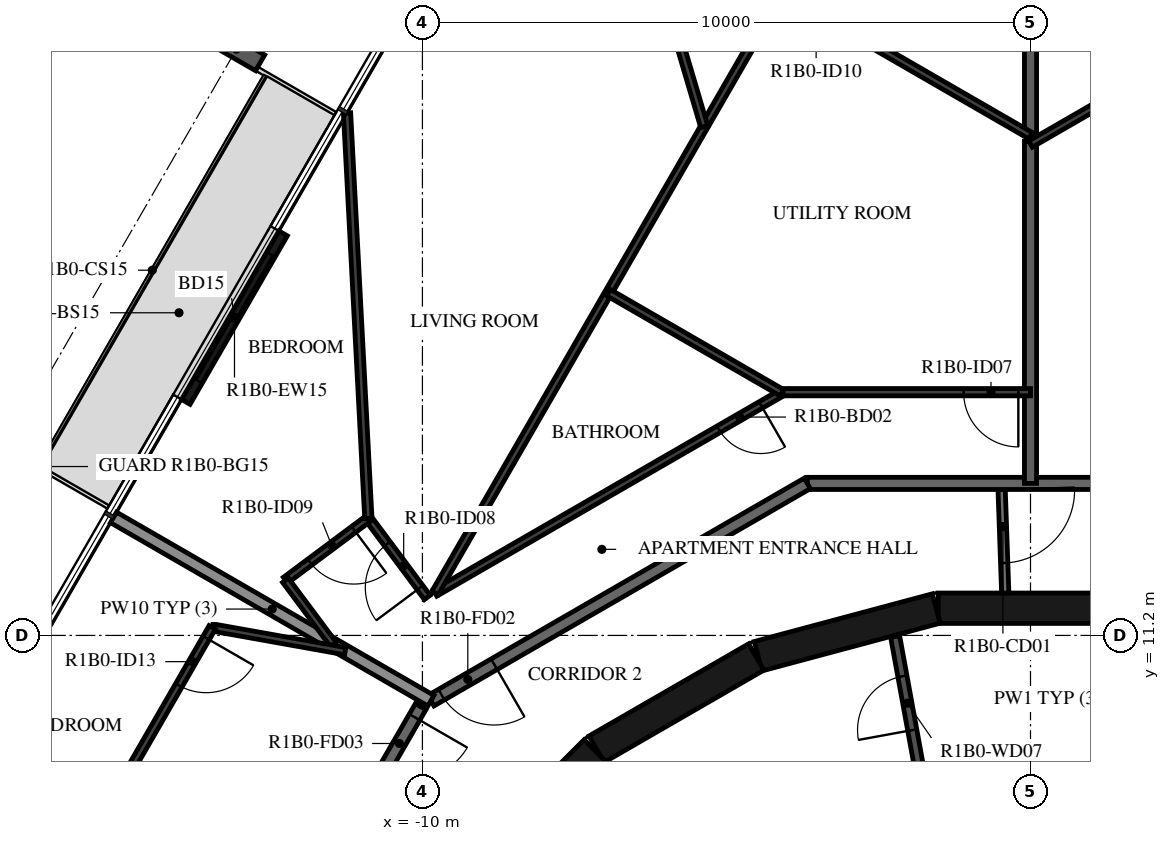
"""IFC4 building model, lengths in metres.
Left out: names, types, materials, properties, quantities, classifications, styles, units other than length and angle.
Written with IfcOpenShell. Run it as: python <this file> out.ifc"""

import sys

from ifc_helpers import new_model, si_unit, direction, frame, frame_2d, origin, origin_2d, place, context, subcontext, project, spatial, rectangle, i_section, extrude, element, fill, save


model = new_model("IFC4")
c1 = context("Model", 3, precision=1e-05, world=origin(), true_north=direction((0.0, 1.0)))
c2 = subcontext(c1, "Body", "Model", "MODEL_VIEW")
j1 = project(units=[si_unit("LENGTHUNIT", "METRE"), si_unit("PLANEANGLEUNIT", "RADIAN")], contexts=[c1])
p1 = place(None, origin())
s1 = spatial("IfcSite", under=j1, at=p1, CompositionType="ELEMENT")
p2 = place(p1, origin())
s2 = spatial("IfcBuilding", under=s1, at=p2, CompositionType="ELEMENT")
p3 = place(p2, frame((0.0, 0.0, 52.4)))
s3 = spatial("IfcBuildingStorey", under=s2, at=p3, CompositionType="ELEMENT", Elevation=52.4)
p4 = place(p3, frame((-13.059, 20.842, -0.38), z_axis=(0.0, 0.0, 1.0), x_axis=(0.50000017485, 0.866025302835, 0.0)))
e1 = element("IfcColumn", 1, at=p4, inside=s3, PredefinedType="COLUMN", context=c2, shape_type="SweptSolid", body=[
    extrude(i_section(OverallWidth=0.3, OverallDepth=0.9, WebThickness=0.019, FlangeThickness=0.035, FilletRadius=0.03, at=origin_2d()), origin(), (0.0, 0.0, 1.0), 3.5),
])
p5 = place(p3, frame((-12.291, 17.812, 0.0), z_axis=(0.0, 0.0, 1.0), x_axis=(-0.499971222258, -0.866042017984, 0.0)))
e2 = element("IfcWall", 2, at=p5, inside=s3, PredefinedType="STANDARD", context=c2, shape_type="SweptSolid", body=[
    extrude(rectangle(XDim=3.2, YDim=0.16, at=frame_2d((1.6, 0.0))), origin(), (0.0, 0.0, 1.0), 3.12),
])
p6 = place(p5, frame((0.4, 0.0, 0.0)))
e3 = element("IfcOpeningElement", 3, at=p6, cuts=e2, PredefinedType="OPENING", context=c2, shape_type="SweptSolid", body=[
    extrude(rectangle(XDim=2.4, YDim=2.4, at=frame_2d((1.2, 1.2))), frame((0.0, 0.09, 0.0), z_axis=(0.0, -1.0, 0.0), x_axis=(1.0, 0.0, 0.0)), (0.0, 0.0, 1.0), 0.18),
])
for number, where, z_axis, x_axis in (
    (4, (1.516, 11.647, 0.0), (0.0, 0.0, 1.0), (-1.0, 0.0, 0.0)),
    (5, (-1.55, 11.643, 0.0), (0.0, 0.0, 1.0), (-0.966, -0.259, 0.0)),
    (6, (-4.51, 10.845, 0.0), (0.0, 0.0, 1.0), (-0.866, -0.5, 0.0)),
):
    element("IfcWall", number, at=place(p3, frame(where, z_axis=z_axis, x_axis=x_axis)), inside=s3, PredefinedType="SHEAR", context=c2, shape_type="SweptSolid", body=[
        extrude(rectangle(XDim=3.033, YDim=0.5, at=frame_2d((1.516, 0.0))), origin(), (0.0, 0.0, 1.0), 3.12),
    ])
p7 = place(p3, frame((-7.164, 9.308, 0.0), z_axis=(0.0, 0.0, 1.0), x_axis=(-0.707106781187, -0.707106781187, 0.0)))
e7 = element("IfcWall", 7, at=p7, inside=s3, PredefinedType="SHEAR", context=c2, shape_type="SweptSolid", body=[
    extrude(rectangle(XDim=3.032, YDim=0.5, at=frame_2d((1.516, 0.0))), origin(), (0.0, 0.0, 1.0), 3.12),
])
p8 = place(p7, frame((1.416, 0.0, 0.0)))
e8 = element("IfcOpeningElement", 8, at=p8, cuts=e7, PredefinedType="OPENING", context=c2, shape_type="SweptSolid", body=[
    extrude(rectangle(XDim=1.2, YDim=2.1, at=frame_2d((0.6, 1.05))), frame((0.0, 0.26, 0.0), z_axis=(0.0, -1.0, 0.0), x_axis=(1.0, 0.0, 0.0)), (0.0, 0.0, 1.0), 0.52),
])
p9 = place(p3, frame((-1.825, 8.99, 0.0), z_axis=(0.0, 0.0, 1.0), x_axis=(-0.179955206115, 0.983674805915, 0.0)))
e9 = element("IfcWall", 9, at=p9, inside=s3, PredefinedType="PARTITIONING", context=c2, shape_type="SweptSolid", body=[
    extrude(rectangle(XDim=2.229, YDim=0.15, at=frame_2d((1.115, 0.0))), origin(), (0.0, 0.0, 1.0), 3.12),
])
p10 = place(p9, frame((0.665, 0.0, 0.0)))
e10 = element("IfcOpeningElement", 10, at=p10, cuts=e9, PredefinedType="OPENING", context=c2, shape_type="SweptSolid", body=[
    extrude(rectangle(XDim=0.9, YDim=2.1, at=frame_2d((0.45, 1.05))), frame((0.0, 0.085, 0.0), z_axis=(0.0, -1.0, 0.0), x_axis=(1.0, 0.0, 0.0)), (0.0, 0.0, 1.0), 0.17),
])
p11 = place(p3, frame((-0.479, 13.7, 0.0), z_axis=(0.0, 0.0, 1.0), x_axis=(0.034919103017, -0.999390142159, 0.0)))
e11 = element("IfcWall", 11, at=p11, inside=s3, PredefinedType="PARTITIONING", context=c2, shape_type="SweptSolid", body=[
    extrude(rectangle(XDim=1.804, YDim=0.12, at=frame_2d((0.902, 0.0))), origin(), (0.0, 0.0, 1.0), 3.12),
])
p12 = place(p11, frame((0.11, 0.0, 0.0)))
e12 = element("IfcOpeningElement", 12, at=p12, cuts=e11, PredefinedType="OPENING", context=c2, shape_type="SweptSolid", body=[
    extrude(rectangle(XDim=1.2, YDim=2.1, at=frame_2d((0.6, 1.05))), frame((0.0, 0.07, 0.0), z_axis=(0.0, -1.0, 0.0), x_axis=(1.0, 0.0, 0.0)), (0.0, 0.0, 1.0), 0.14),
])
p13 = place(p3, frame((3.671, 13.7, 0.0), z_axis=(0.0, 0.0, 1.0), x_axis=(-1.0, 0.0, 0.0)))
e13 = element("IfcWall", 13, at=p13, inside=s3, PredefinedType="STANDARD", context=c2, shape_type="SweptSolid", body=[
    extrude(rectangle(XDim=7.342, YDim=0.2, at=frame_2d((3.671, 0.0))), origin(), (0.0, 0.0, 1.0), 3.12),
])
p14 = place(p3, frame((-3.671, 13.7, 0.0), z_axis=(0.0, 0.0, 1.0), x_axis=(-0.866031419417, -0.499989580474, 0.0)))
e14 = element("IfcWall", 14, at=p14, inside=s3, PredefinedType="STANDARD", context=c2, shape_type="SweptSolid", body=[
    extrude(rectangle(XDim=7.147, YDim=0.2, at=frame_2d((3.573, 0.0))), origin(), (0.0, 0.0, 1.0), 3.12),
])
p15 = place(p14, frame((5.947, 0.0, 0.0)))
e15 = element("IfcOpeningElement", 15, at=p15, cuts=e14, PredefinedType="OPENING", context=c2, shape_type="SweptSolid", body=[
    extrude(rectangle(XDim=1.0, YDim=2.1, at=frame_2d((0.5, 1.05))), frame((0.0, 0.11, 0.0), z_axis=(0.0, -1.0, 0.0), x_axis=(1.0, 0.0, 0.0)), (0.0, 0.0, 1.0), 0.22),
])
p16 = place(p3, frame((-10.029, 10.029, 0.0), z_axis=(0.0, 0.0, 1.0), x_axis=(-0.500001669485, -0.866024439905, 0.0)))
e16 = element("IfcWall", 16, at=p16, inside=s3, PredefinedType="STANDARD", context=c2, shape_type="SweptSolid", body=[
    extrude(rectangle(XDim=7.342, YDim=0.2, at=frame_2d((3.671, 0.0))), origin(), (0.0, 0.0, 1.0), 3.12),
])
p17 = place(p16, frame((0.2, 0.0, 0.0)))
e17 = element("IfcOpeningElement", 17, at=p17, cuts=e16, PredefinedType="OPENING", context=c2, shape_type="SweptSolid", body=[
    extrude(rectangle(XDim=1.0, YDim=2.1, at=frame_2d((0.5, 1.05))), frame((0.0, 0.11, 0.0), z_axis=(0.0, -1.0, 0.0), x_axis=(1.0, 0.0, 0.0)), (0.0, 0.0, 1.0), 0.22),
])
p18 = place(p3, frame((0.0, 19.326, 0.0), z_axis=(0.0, 0.0, 1.0), x_axis=(0.0, -1.0, 0.0)))
e18 = element("IfcWall", 18, at=p18, inside=s3, PredefinedType="STANDARD", context=c2, shape_type="SweptSolid", body=[
    extrude(rectangle(XDim=5.626, YDim=0.2, at=frame_2d((2.813, 0.0))), origin(), (0.0, 0.0, 1.0), 3.12),
])
p19 = place(p3, frame((0.0, 21.81, 0.0), z_axis=(0.0, 0.0, 1.0), x_axis=(0.0, -1.0, 0.0)))
e19 = element("IfcWall", 19, at=p19, inside=s3, PredefinedType="STANDARD", context=c2, shape_type="SweptSolid", body=[
    extrude(rectangle(XDim=2.392, YDim=0.2, at=frame_2d((1.196, 0.0))), origin(), (0.0, 0.0, 1.0), 3.12),
])
p20 = place(p3, frame((-15.08, 13.14, 0.0), z_axis=(0.0, 0.0, 1.0), x_axis=(0.86603112331, -0.49999009336, 0.0)))
e20 = element("IfcWall", 20, at=p20, inside=s3, PredefinedType="STANDARD", context=c2, shape_type="SweptSolid", body=[
    extrude(rectangle(XDim=6.027, YDim=0.2, at=frame_2d((3.014, 0.0))), origin(), (0.0, 0.0, 1.0), 2.73),
])
p21 = place(p3, frame((4.841, 22.075, 0.0), z_axis=(0.0, 0.0, 1.0), x_axis=(-0.866019751484, -0.500009789943, 0.0)))
e21 = element("IfcWall", 21, at=p21, inside=s3, PredefinedType="PARTITIONING", context=c2, shape_type="SweptSolid", body=[
    extrude(rectangle(XDim=5.59, YDim=0.12, at=frame_2d((2.795, 0.0))), origin(), (0.0, 0.0, 1.0), 3.12),
])
p22 = place(p21, frame((0.2, 0.0, 0.0)))
e22 = element("IfcOpeningElement", 22, at=p22, cuts=e21, PredefinedType="OPENING", context=c2, shape_type="SweptSolid", body=[
    extrude(rectangle(XDim=0.9, YDim=2.1, at=frame_2d((0.45, 1.05))), frame((0.0, 0.07, 0.0), z_axis=(0.0, -1.0, 0.0), x_axis=(1.0, 0.0, 0.0)), (0.0, 0.0, 1.0), 0.14),
])
p23 = place(p3, frame((0.0, 15.2, 0.0), z_axis=(0.0, 0.0, 1.0), x_axis=(-1.0, 0.0, 0.0)))
e23 = element("IfcWall", 23, at=p23, inside=s3, PredefinedType="PARTITIONING", context=c2, shape_type="SweptSolid", body=[
    extrude(rectangle(XDim=4.073, YDim=0.12, at=frame_2d((2.036, 0.0))), origin(), (0.0, 0.0, 1.0), 3.12),
])
p24 = place(p23, frame((0.2, 0.0, 0.0)))
e24 = element("IfcOpeningElement", 24, at=p24, cuts=e23, PredefinedType="OPENING", context=c2, shape_type="SweptSolid", body=[
    extrude(rectangle(XDim=0.9, YDim=2.1, at=frame_2d((0.45, 1.05))), frame((0.0, 0.07, 0.0), z_axis=(0.0, -1.0, 0.0), x_axis=(1.0, 0.0, 0.0)), (0.0, 0.0, 1.0), 0.14),
])
p25 = place(p3, frame((-9.92, 11.824, 0.0), z_axis=(0.0, 0.0, 1.0), x_axis=(-0.597853402964, 0.801605456921, 0.0)))
e25 = element("IfcWall", 25, at=p25, inside=s3, PredefinedType="PARTITIONING", context=c2, shape_type="SweptSolid", body=[
    extrude(rectangle(XDim=1.621, YDim=0.12, at=frame_2d((0.811, 0.0))), origin(), (0.0, 0.0, 1.0), 3.12),
])
p26 = place(p25, frame((0.2, 0.0, 0.0)))
e26 = element("IfcOpeningElement", 26, at=p26, cuts=e25, PredefinedType="OPENING", context=c2, shape_type="SweptSolid", body=[
    extrude(rectangle(XDim=0.9, YDim=2.1, at=frame_2d((0.45, 1.05))), frame((0.0, 0.07, 0.0), z_axis=(0.0, -1.0, 0.0), x_axis=(1.0, 0.0, 0.0)), (0.0, 0.0, 1.0), 0.14),
])
p27 = place(p3, frame((-4.088, 15.191, 0.0), z_axis=(0.0, 0.0, 1.0), x_axis=(-0.866024500911, -0.50000156382, 0.0)))
e27 = element("IfcWall", 27, at=p27, inside=s3, PredefinedType="PARTITIONING", context=c2, shape_type="SweptSolid", body=[
    extrude(rectangle(XDim=6.587, YDim=0.12, at=frame_2d((3.294, 0.0))), origin(), (0.0, 0.0, 1.0), 3.12),
])
p28 = place(p27, frame((0.4, 0.0, 0.0)))
e28 = element("IfcOpeningElement", 28, at=p28, cuts=e27, PredefinedType="OPENING", context=c2, shape_type="SweptSolid", body=[
    extrude(rectangle(XDim=0.8, YDim=2.1, at=frame_2d((0.4, 1.05))), frame((0.0, 0.07, 0.0), z_axis=(0.0, -1.0, 0.0), x_axis=(1.0, 0.0, 0.0)), (0.0, 0.0, 1.0), 0.14),
])
p29 = place(p3, frame((-10.889, 13.124, 0.0), z_axis=(0.0, 0.0, 1.0), x_axis=(-0.801616976804, -0.597837956724, 0.0)))
e29 = element("IfcWall", 29, at=p29, inside=s3, PredefinedType="PARTITIONING", context=c2, shape_type="SweptSolid", body=[
    extrude(rectangle(XDim=1.7, YDim=0.12, at=frame_2d((0.85, 0.0))), origin(), (0.0, 0.0, 1.0), 3.12),
])
p30 = place(p29, frame((0.3, 0.0, 0.0)))
e30 = element("IfcOpeningElement", 30, at=p30, cuts=e29, PredefinedType="OPENING", context=c2, shape_type="SweptSolid", body=[
    extrude(rectangle(XDim=0.9, YDim=2.1, at=frame_2d((0.45, 1.05))), frame((0.0, 0.07, 0.0), z_axis=(0.0, -1.0, 0.0), x_axis=(1.0, 0.0, 0.0)), (0.0, 0.0, 1.0), 0.14),
])
p31 = place(p3, frame((-12.252, 12.107, 0.0), z_axis=(0.0, 0.0, 1.0), x_axis=(0.597827926538, -0.801624457119, 0.0)))
e31 = element("IfcWall", 31, at=p31, inside=s3, PredefinedType="PARTITIONING", context=c2, shape_type="SweptSolid", body=[
    extrude(rectangle(XDim=1.314, YDim=0.12, at=frame_2d((0.657, 0.0))), origin(), (0.0, 0.0, 1.0), 3.12),
])
p32 = place(p3, frame((-9.793, 11.897, 0.0), z_axis=(0.0, 0.0, 1.0), x_axis=(0.499981117606, 0.866036305265, 0.0)))
e32 = element("IfcWall", 32, at=p32, inside=s3, PredefinedType="PARTITIONING", context=c2, shape_type="SweptSolid", body=[
    extrude(rectangle(XDim=14.434, YDim=0.12, at=frame_2d((7.217, 0.0))), origin(), (0.0, 0.0, 1.0), 3.12),
])
p33 = place(p32, frame((11.97, 0.0, 0.0)))
e33 = element("IfcOpeningElement", 33, at=p33, cuts=e32, PredefinedType="OPENING", context=c2, shape_type="SweptSolid", body=[
    extrude(rectangle(XDim=0.9, YDim=2.1, at=frame_2d((0.45, 1.05))), frame((0.0, 0.07, 0.0), z_axis=(0.0, -1.0, 0.0), x_axis=(1.0, 0.0, 0.0)), (0.0, 0.0, 1.0), 0.14),
])
p34 = place(p3, frame((-4.088, 21.779, 0.0), z_axis=(0.0, 0.0, 1.0), x_axis=(0.866032292145, -0.49998806882, 0.0)))
e34 = element("IfcWall", 34, at=p34, inside=s3, PredefinedType="PARTITIONING", context=c2, shape_type="SweptSolid", body=[
    extrude(rectangle(XDim=4.721, YDim=0.12, at=frame_2d((2.36, 0.0))), origin(), (0.0, 0.0, 1.0), 3.12),
])
p35 = place(p34, frame((0.2, 0.0, 0.0)))
e35 = element("IfcOpeningElement", 35, at=p35, cuts=e34, PredefinedType="OPENING", context=c2, shape_type="SweptSolid", body=[
    extrude(rectangle(XDim=0.9, YDim=2.1, at=frame_2d((0.45, 1.05))), frame((0.0, 0.07, 0.0), z_axis=(0.0, -1.0, 0.0), x_axis=(1.0, 0.0, 0.0)), (0.0, 0.0, 1.0), 0.14),
])
p36 = place(p3, frame((-6.941, 16.838, 0.0), z_axis=(0.0, 0.0, 1.0), x_axis=(0.866017718408, -0.500013311227, 0.0)))
e36 = element("IfcWall", 36, at=p36, inside=s3, PredefinedType="PARTITIONING", context=c2, shape_type="SweptSolid", body=[
    extrude(rectangle(XDim=3.294, YDim=0.12, at=frame_2d((1.647, 0.0))), origin(), (0.0, 0.0, 1.0), 3.12),
])
p37 = place(p3, frame((-7.4, 26.443, 0.0), z_axis=(0.0, 0.0, 1.0), x_axis=(0.283756762476, -0.958896292489, 0.0)))
e37 = element("IfcWall", 37, at=p37, inside=s3, PredefinedType="PARTITIONING", context=c2, shape_type="SweptSolid", body=[
    extrude(rectangle(XDim=7.17, YDim=0.12, at=frame_2d((3.585, 0.0))), origin(), (0.0, 0.0, 1.0), 3.12),
])
p38 = place(p3, frame((-11.24, 19.792, 0.0), z_axis=(0.0, 0.0, 1.0), x_axis=(0.052579943632, -0.998616718029, 0.0)))
e38 = element("IfcWall", 38, at=p38, inside=s3, PredefinedType="PARTITIONING", context=c2, shape_type="SweptSolid", body=[
    extrude(rectangle(XDim=6.677, YDim=0.12, at=frame_2d((3.338, 0.0))), origin(), (0.0, 0.0, 1.0), 3.12),
])
p39 = place(p3, frame((-11.27, 10.94, 0.0), z_axis=(0.0, 0.0, 1.0), x_axis=(-0.984382718707, 0.176041651637, 0.0)))
e39 = element("IfcWall", 39, at=p39, inside=s3, PredefinedType="PARTITIONING", context=c2, shape_type="SweptSolid", body=[
    extrude(rectangle(XDim=2.222, YDim=0.12, at=frame_2d((1.111, 0.0))), origin(), (0.0, 0.0, 1.0), 3.12),
])
p40 = place(p3, frame((-13.457, 11.332, 0.0), z_axis=(0.0, 0.0, 1.0), x_axis=(-0.499974350878, -0.866040211805, 0.0)))
e40 = element("IfcWall", 40, at=p40, inside=s3, PredefinedType="PARTITIONING", context=c2, shape_type="SweptSolid", body=[
    extrude(rectangle(XDim=3.3, YDim=0.12, at=frame_2d((1.65, 0.0))), origin(), (0.0, 0.0, 1.0), 3.12),
])
p41 = place(p40, frame((0.2, 0.0, 0.0)))
e41 = element("IfcOpeningElement", 41, at=p41, cuts=e40, PredefinedType="OPENING", context=c2, shape_type="SweptSolid", body=[
    extrude(rectangle(XDim=0.9, YDim=2.1, at=frame_2d((0.45, 1.05))), frame((0.0, 0.07, 0.0), z_axis=(0.0, -1.0, 0.0), x_axis=(1.0, 0.0, 0.0)), (0.0, 0.0, 1.0), 0.14),
])
p42 = place(p6, origin())
e42 = element("IfcDoor", 42, at=p42, inside=s3, OperationType="DOUBLE_DOOR_SLIDING", PredefinedType="DOOR", context=c2, shape_type="SweptSolid", body=[
    extrude(rectangle(XDim=2.4, YDim=2.4, at=frame_2d((1.2, 1.2))), frame((0.0, 0.025, 0.0), z_axis=(0.0, -1.0, 0.0), x_axis=(1.0, 0.0, 0.0)), (0.0, 0.0, 1.0), 0.05),
])
fill(e3, e42)
p43 = place(p10, origin())
e43 = element("IfcDoor", 43, at=p43, inside=s3, OperationType="SINGLE_SWING_RIGHT", PredefinedType="DOOR", context=c2, shape_type="SweptSolid", body=[
    extrude(rectangle(XDim=0.9, YDim=2.1, at=frame_2d((0.45, 1.05))), frame((0.0, 0.025, 0.0), z_axis=(0.0, -1.0, 0.0), x_axis=(1.0, 0.0, 0.0)), (0.0, 0.0, 1.0), 0.05),
])
fill(e10, e43)
p44 = place(p15, origin())
e44 = element("IfcDoor", 44, at=p44, inside=s3, OperationType="SINGLE_SWING_LEFT", PredefinedType="DOOR", context=c2, shape_type="SweptSolid", body=[
    extrude(rectangle(XDim=1.0, YDim=2.1, at=frame_2d((0.5, 1.05))), frame((0.0, 0.025, 0.0), z_axis=(0.0, -1.0, 0.0), x_axis=(1.0, 0.0, 0.0)), (0.0, 0.0, 1.0), 0.05),
])
fill(e15, e44)
p45 = place(p24, origin())
e45 = element("IfcDoor", 45, at=p45, inside=s3, OperationType="SINGLE_SWING_RIGHT", PredefinedType="DOOR", context=c2, shape_type="SweptSolid", body=[
    extrude(rectangle(XDim=0.9, YDim=2.1, at=frame_2d((0.45, 1.05))), frame((0.0, 0.025, 0.0), z_axis=(0.0, -1.0, 0.0), x_axis=(1.0, 0.0, 0.0)), (0.0, 0.0, 1.0), 0.05),
])
fill(e24, e45)
p46 = place(p26, origin())
e46 = element("IfcDoor", 46, at=p46, inside=s3, OperationType="SINGLE_SWING_RIGHT", PredefinedType="DOOR", context=c2, shape_type="SweptSolid", body=[
    extrude(rectangle(XDim=0.9, YDim=2.1, at=frame_2d((0.45, 1.05))), frame((0.0, 0.025, 0.0), z_axis=(0.0, -1.0, 0.0), x_axis=(1.0, 0.0, 0.0)), (0.0, 0.0, 1.0), 0.05),
])
fill(e26, e46)
p47 = place(p28, origin())
e47 = element("IfcDoor", 47, at=p47, inside=s3, OperationType="SINGLE_SWING_LEFT", PredefinedType="DOOR", context=c2, shape_type="SweptSolid", body=[
    extrude(rectangle(XDim=0.8, YDim=2.1, at=frame_2d((0.4, 1.05))), frame((0.0, 0.025, 0.0), z_axis=(0.0, -1.0, 0.0), x_axis=(1.0, 0.0, 0.0)), (0.0, 0.0, 1.0), 0.05),
])
fill(e28, e47)
p48 = place(p30, origin())
e48 = element("IfcDoor", 48, at=p48, inside=s3, OperationType="SINGLE_SWING_LEFT", PredefinedType="DOOR", context=c2, shape_type="SweptSolid", body=[
    extrude(rectangle(XDim=0.9, YDim=2.1, at=frame_2d((0.45, 1.05))), frame((0.0, 0.025, 0.0), z_axis=(0.0, -1.0, 0.0), x_axis=(1.0, 0.0, 0.0)), (0.0, 0.0, 1.0), 0.05),
])
fill(e30, e48)
p49 = place(p17, origin())
e49 = element("IfcDoor", 49, at=p49, inside=s3, OperationType="SINGLE_SWING_LEFT", PredefinedType="DOOR", context=c2, shape_type="SweptSolid", body=[
    extrude(rectangle(XDim=1.0, YDim=2.1, at=frame_2d((0.5, 1.05))), frame((0.0, 0.025, 0.0), z_axis=(0.0, -1.0, 0.0), x_axis=(1.0, 0.0, 0.0)), (0.0, 0.0, 1.0), 0.05),
])
fill(e17, e49)
p50 = place(p41, origin())
e50 = element("IfcDoor", 50, at=p50, inside=s3, OperationType="SINGLE_SWING_LEFT", PredefinedType="DOOR", context=c2, shape_type="SweptSolid", body=[
    extrude(rectangle(XDim=0.9, YDim=2.1, at=frame_2d((0.45, 1.05))), frame((0.0, 0.025, 0.0), z_axis=(0.0, -1.0, 0.0), x_axis=(1.0, 0.0, 0.0)), (0.0, 0.0, 1.0), 0.05),
])
fill(e41, e50)
p51 = place(p12, origin())
e51 = element("IfcDoor", 51, at=p51, inside=s3, OperationType="DOUBLE_DOOR_SINGLE_SWING", PredefinedType="DOOR", context=c2, shape_type="SweptSolid", body=[
    extrude(rectangle(XDim=1.2, YDim=2.1, at=frame_2d((0.6, 1.05))), frame((0.0, 0.025, 0.0), z_axis=(0.0, -1.0, 0.0), x_axis=(1.0, 0.0, 0.0)), (0.0, 0.0, 1.0), 0.05),
])
fill(e12, e51)
save(model, sys.argv[1])
